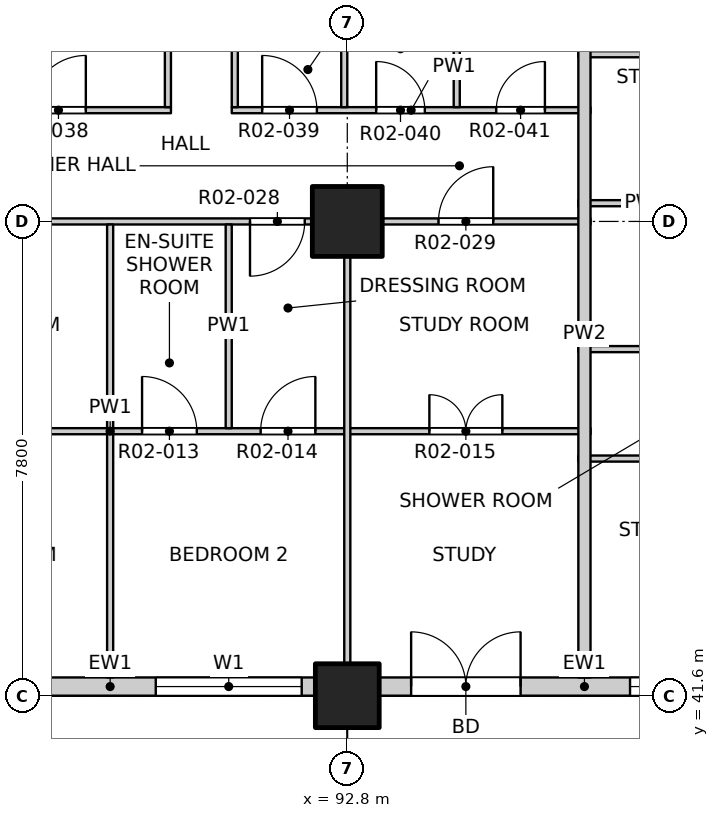
"""IFC4 building model, lengths in metres.
Left out: names, types, materials, properties, quantities, classifications, styles, units other than length and angle.
Written with IfcOpenShell. Run it as: python <this file> out.ifc"""

import sys

from ifc_helpers import new_model, si_unit, direction, frame, frame_2d, origin, origin_2d, place, context, subcontext, project, spatial, rectangle, extrude, element, fill, save


model = new_model("IFC4")
c1 = context("Model", 3, precision=1e-05, world=origin(), true_north=direction((0.0, 1.0)))
c2 = subcontext(c1, "Body", "Model", "MODEL_VIEW")
j1 = project(units=[si_unit("LENGTHUNIT", "METRE"), si_unit("PLANEANGLEUNIT", "RADIAN")], contexts=[c1])
p1 = place(None, origin())
s1 = spatial("IfcSite", under=j1, at=p1, CompositionType="ELEMENT")
p2 = place(p1, origin())
s2 = spatial("IfcBuilding", under=s1, at=p2, CompositionType="ELEMENT")
p3 = place(p2, frame((0.0, 0.0, 29.7)))
s3 = spatial("IfcBuildingStorey", under=s2, at=p3, CompositionType="ELEMENT", Elevation=29.7)
p4 = place(p3, frame((92.8, 41.6, -0.25), z_axis=(0.0, 0.0, 1.0), x_axis=(1.0, 0.0, 0.0)))
e1 = element("IfcColumn", 1, at=p4, inside=s3, PredefinedType="COLUMN", context=c2, shape_type="SweptSolid", body=[
    extrude(rectangle(XDim=1.05, YDim=1.05, at=origin_2d()), origin(), (0.0, 0.0, 1.0), 3.4),
])
p5 = place(p3, frame((92.8, 49.4, -0.25), z_axis=(0.0, 0.0, 1.0), x_axis=(1.0, 0.0, 0.0)))
e2 = element("IfcColumn", 2, at=p5, inside=s3, PredefinedType="COLUMN", context=c2, shape_type="SweptSolid", body=[
    extrude(rectangle(XDim=1.15, YDim=1.15, at=origin_2d()), origin(), (0.0, 0.0, 1.0), 3.4),
])
p6 = place(p3, frame((85.525, 41.75, 0.0), z_axis=(0.0, 0.0, 1.0), x_axis=(1.0, 0.0, 0.0)))
e3 = element("IfcWall", 3, at=p6, inside=s3, PredefinedType="SOLIDWALL", context=c2, shape_type="SweptSolid", body=[
    extrude(rectangle(XDim=6.75, YDim=0.3, at=frame_2d((3.375, 0.0))), origin(), (0.0, 0.0, 1.0), 2.7),
])
p7 = place(p6, frame((0.525, 0.0, 0.0)))
e4 = element("IfcOpeningElement", 4, at=p7, cuts=e3, PredefinedType="OPENING", context=c2, shape_type="SweptSolid", body=[
    extrude(rectangle(XDim=1.8, YDim=2.4, at=frame_2d((0.9, 1.2))), frame((0.0, 0.16, 0.0), z_axis=(0.0, -1.0, 0.0), x_axis=(1.0, 0.0, 0.0)), (0.0, 0.0, 1.0), 0.32),
])
p8 = place(p6, frame((4.125, 0.0, 0.9)))
e5 = element("IfcOpeningElement", 5, at=p8, cuts=e3, PredefinedType="OPENING", context=c2, shape_type="SweptSolid", body=[
    extrude(rectangle(XDim=2.4, YDim=1.8, at=frame_2d((1.2, 0.9))), frame((0.0, 0.16, 0.0), z_axis=(0.0, -1.0, 0.0), x_axis=(1.0, 0.0, 0.0)), (0.0, 0.0, 1.0), 0.32),
])
p9 = place(p3, frame((93.325, 41.75, 0.0), z_axis=(0.0, 0.0, 1.0), x_axis=(1.0, 0.0, 0.0)))
e6 = element("IfcWall", 6, at=p9, inside=s3, PredefinedType="SOLIDWALL", context=c2, shape_type="SweptSolid", body=[
    extrude(rectangle(XDim=6.75, YDim=0.3, at=frame_2d((3.375, 0.0))), origin(), (0.0, 0.0, 1.0), 2.7),
])
p10 = place(p9, frame((0.525, 0.0, 0.0)))
e7 = element("IfcOpeningElement", 7, at=p10, cuts=e6, PredefinedType="OPENING", context=c2, shape_type="SweptSolid", body=[
    extrude(rectangle(XDim=1.8, YDim=2.4, at=frame_2d((0.9, 1.2))), frame((0.0, 0.16, 0.0), z_axis=(0.0, -1.0, 0.0), x_axis=(1.0, 0.0, 0.0)), (0.0, 0.0, 1.0), 0.32),
])
p11 = place(p9, frame((4.125, 0.0, 0.9)))
e8 = element("IfcOpeningElement", 8, at=p11, cuts=e6, PredefinedType="OPENING", context=c2, shape_type="SweptSolid", body=[
    extrude(rectangle(XDim=2.4, YDim=1.8, at=frame_2d((1.2, 0.9))), frame((0.0, 0.16, 0.0), z_axis=(0.0, -1.0, 0.0), x_axis=(1.0, 0.0, 0.0)), (0.0, 0.0, 1.0), 0.32),
])
p12 = place(p3, frame((96.6, 45.5, 0.0), z_axis=(0.0, 0.0, 1.0), x_axis=(1.0, 0.0, 0.0)))
e9 = element("IfcWall", 9, at=p12, inside=s3, PredefinedType="PARTITIONING", context=c2, shape_type="SweptSolid", body=[
    extrude(rectangle(XDim=11.5, YDim=0.1, at=frame_2d((5.75, 0.0))), origin(), (0.0, 0.0, 1.0), 3.15),
])
p13 = place(p12, frame((2.635, 0.0, 0.0)))
e10 = element("IfcOpeningElement", 10, at=p13, cuts=e9, PredefinedType="OPENING", context=c2, shape_type="SweptSolid", body=[
    extrude(rectangle(XDim=0.9, YDim=2.1, at=frame_2d((0.45, 1.05))), frame((0.0, 0.06, 0.0), z_axis=(0.0, -1.0, 0.0), x_axis=(1.0, 0.0, 0.0)), (0.0, 0.0, 1.0), 0.12),
])
p14 = place(p3, frame((81.0, 45.95, 0.0), z_axis=(0.0, 0.0, 1.0), x_axis=(1.0, 0.0, 0.0)))
e11 = element("IfcWall", 11, at=p14, inside=s3, PredefinedType="PARTITIONING", context=c2, shape_type="SweptSolid", body=[
    extrude(rectangle(XDim=15.8, YDim=0.1, at=frame_2d((7.9, 0.0))), origin(), (0.0, 0.0, 1.0), 3.15),
])
p15 = place(p14, frame((0.625, 0.0, 0.0)))
e12 = element("IfcOpeningElement", 12, at=p15, cuts=e11, PredefinedType="OPENING", context=c2, shape_type="SweptSolid", body=[
    extrude(rectangle(XDim=0.9, YDim=2.1, at=frame_2d((0.45, 1.05))), frame((0.0, 0.06, 0.0), z_axis=(0.0, -1.0, 0.0), x_axis=(1.0, 0.0, 0.0)), (0.0, 0.0, 1.0), 0.12),
])
p16 = place(p14, frame((2.575, 0.0, 0.0)))
e13 = element("IfcOpeningElement", 13, at=p16, cuts=e11, PredefinedType="OPENING", context=c2, shape_type="SweptSolid", body=[
    extrude(rectangle(XDim=0.9, YDim=2.1, at=frame_2d((0.45, 1.05))), frame((0.0, 0.06, 0.0), z_axis=(0.0, -1.0, 0.0), x_axis=(1.0, 0.0, 0.0)), (0.0, 0.0, 1.0), 0.12),
])
p17 = place(p14, frame((5.35, 0.0, 0.0)))
e14 = element("IfcOpeningElement", 14, at=p17, cuts=e11, PredefinedType="OPENING", context=c2, shape_type="SweptSolid", body=[
    extrude(rectangle(XDim=1.2, YDim=2.1, at=frame_2d((0.6, 1.05))), frame((0.0, 0.06, 0.0), z_axis=(0.0, -1.0, 0.0), x_axis=(1.0, 0.0, 0.0)), (0.0, 0.0, 1.0), 0.12),
])
p18 = place(p14, frame((8.425, 0.0, 0.0)))
e15 = element("IfcOpeningElement", 15, at=p18, cuts=e11, PredefinedType="OPENING", context=c2, shape_type="SweptSolid", body=[
    extrude(rectangle(XDim=0.9, YDim=2.1, at=frame_2d((0.45, 1.05))), frame((0.0, 0.06, 0.0), z_axis=(0.0, -1.0, 0.0), x_axis=(1.0, 0.0, 0.0)), (0.0, 0.0, 1.0), 0.12),
])
p19 = place(p14, frame((10.375, 0.0, 0.0)))
e16 = element("IfcOpeningElement", 16, at=p19, cuts=e11, PredefinedType="OPENING", context=c2, shape_type="SweptSolid", body=[
    extrude(rectangle(XDim=0.9, YDim=2.1, at=frame_2d((0.45, 1.05))), frame((0.0, 0.06, 0.0), z_axis=(0.0, -1.0, 0.0), x_axis=(1.0, 0.0, 0.0)), (0.0, 0.0, 1.0), 0.12),
])
p20 = place(p14, frame((13.15, 0.0, 0.0)))
e17 = element("IfcOpeningElement", 17, at=p20, cuts=e11, PredefinedType="OPENING", context=c2, shape_type="SweptSolid", body=[
    extrude(rectangle(XDim=1.2, YDim=2.1, at=frame_2d((0.6, 1.05))), frame((0.0, 0.06, 0.0), z_axis=(0.0, -1.0, 0.0), x_axis=(1.0, 0.0, 0.0)), (0.0, 0.0, 1.0), 0.12),
])
p21 = place(p3, frame((96.6, 47.3, 0.0), z_axis=(0.0, 0.0, 1.0), x_axis=(1.0, 0.0, 0.0)))
e18 = element("IfcWall", 18, at=p21, inside=s3, PredefinedType="PARTITIONING", context=c2, shape_type="SweptSolid", body=[
    extrude(rectangle(XDim=2.22, YDim=0.1, at=frame_2d((1.11, 0.0))), origin(), (0.0, 0.0, 1.0), 3.15),
])
p22 = place(p3, frame((73.2, 49.4, 0.0), z_axis=(0.0, 0.0, 1.0), x_axis=(1.0, 0.0, 0.0)))
e19 = element("IfcWall", 19, at=p22, inside=s3, PredefinedType="PARTITIONING", context=c2, shape_type="SweptSolid", body=[
    extrude(rectangle(XDim=23.6, YDim=0.1, at=frame_2d((11.8, 0.0))), origin(), (0.0, 0.0, 1.0), 3.15),
])
p23 = place(p22, frame((1.6, 0.0, 0.0)))
e20 = element("IfcOpeningElement", 20, at=p23, cuts=e19, PredefinedType="OPENING", context=c2, shape_type="SweptSolid", body=[
    extrude(rectangle(XDim=0.9, YDim=2.1, at=frame_2d((0.45, 1.05))), frame((0.0, 0.06, 0.0), z_axis=(0.0, -1.0, 0.0), x_axis=(1.0, 0.0, 0.0)), (0.0, 0.0, 1.0), 0.12),
])
p24 = place(p22, frame((6.475, 0.0, 0.0)))
e21 = element("IfcOpeningElement", 21, at=p24, cuts=e19, PredefinedType="OPENING", context=c2, shape_type="SweptSolid", body=[
    extrude(rectangle(XDim=0.9, YDim=2.1, at=frame_2d((0.45, 1.05))), frame((0.0, 0.06, 0.0), z_axis=(0.0, -1.0, 0.0), x_axis=(1.0, 0.0, 0.0)), (0.0, 0.0, 1.0), 0.12),
])
p25 = place(p22, frame((10.2, 0.0, 0.0)))
e22 = element("IfcOpeningElement", 22, at=p25, cuts=e19, PredefinedType="OPENING", context=c2, shape_type="SweptSolid", body=[
    extrude(rectangle(XDim=0.9, YDim=2.1, at=frame_2d((0.45, 1.05))), frame((0.0, 0.06, 0.0), z_axis=(0.0, -1.0, 0.0), x_axis=(1.0, 0.0, 0.0)), (0.0, 0.0, 1.0), 0.12),
])
p26 = place(p22, frame((13.3, 0.0, 0.0)))
e23 = element("IfcOpeningElement", 23, at=p26, cuts=e19, PredefinedType="OPENING", context=c2, shape_type="SweptSolid", body=[
    extrude(rectangle(XDim=0.9, YDim=2.1, at=frame_2d((0.45, 1.05))), frame((0.0, 0.06, 0.0), z_axis=(0.0, -1.0, 0.0), x_axis=(1.0, 0.0, 0.0)), (0.0, 0.0, 1.0), 0.12),
])
p27 = place(p22, frame((18.0, 0.0, 0.0)))
e24 = element("IfcOpeningElement", 24, at=p27, cuts=e19, PredefinedType="OPENING", context=c2, shape_type="SweptSolid", body=[
    extrude(rectangle(XDim=0.9, YDim=2.1, at=frame_2d((0.45, 1.05))), frame((0.0, 0.06, 0.0), z_axis=(0.0, -1.0, 0.0), x_axis=(1.0, 0.0, 0.0)), (0.0, 0.0, 1.0), 0.12),
])
p28 = place(p22, frame((21.1, 0.0, 0.0)))
e25 = element("IfcOpeningElement", 25, at=p28, cuts=e19, PredefinedType="OPENING", context=c2, shape_type="SweptSolid", body=[
    extrude(rectangle(XDim=0.9, YDim=2.1, at=frame_2d((0.45, 1.05))), frame((0.0, 0.06, 0.0), z_axis=(0.0, -1.0, 0.0), x_axis=(1.0, 0.0, 0.0)), (0.0, 0.0, 1.0), 0.12),
])
p29 = place(p3, frame((96.6, 49.7, 0.0), z_axis=(0.0, 0.0, 1.0), x_axis=(1.0, 0.0, 0.0)))
e26 = element("IfcWall", 26, at=p29, inside=s3, PredefinedType="PARTITIONING", context=c2, shape_type="SweptSolid", body=[
    extrude(rectangle(XDim=2.22, YDim=0.1, at=frame_2d((1.11, 0.0))), origin(), (0.0, 0.0, 1.0), 3.15),
])
p30 = place(p3, frame((78.9, 51.23, 0.0), z_axis=(0.0, 0.0, 1.0), x_axis=(1.0, 0.0, 0.0)))
e27 = element("IfcWall", 27, at=p30, inside=s3, PredefinedType="PARTITIONING", context=c2, shape_type="SweptSolid", body=[
    extrude(rectangle(XDim=11.0, YDim=0.1, at=frame_2d((5.5, 0.0))), origin(), (0.0, 0.0, 1.0), 3.15),
])
p31 = place(p30, frame((0.725, 0.0, 0.0)))
e28 = element("IfcOpeningElement", 28, at=p31, cuts=e27, PredefinedType="OPENING", context=c2, shape_type="SweptSolid", body=[
    extrude(rectangle(XDim=0.8, YDim=2.1, at=frame_2d((0.4, 1.05))), frame((0.0, 0.06, 0.0), z_axis=(0.0, -1.0, 0.0), x_axis=(1.0, 0.0, 0.0)), (0.0, 0.0, 1.0), 0.12),
])
p32 = place(p30, frame((2.95, 0.0, 0.0)))
e29 = element("IfcOpeningElement", 29, at=p32, cuts=e27, PredefinedType="OPENING", context=c2, shape_type="SweptSolid", body=[
    extrude(rectangle(XDim=0.9, YDim=2.1, at=frame_2d((0.45, 1.05))), frame((0.0, 0.06, 0.0), z_axis=(0.0, -1.0, 0.0), x_axis=(1.0, 0.0, 0.0)), (0.0, 0.0, 1.0), 0.12),
])
p33 = place(p30, frame((5.575, 0.0, 0.0)))
e30 = element("IfcOpeningElement", 30, at=p33, cuts=e27, PredefinedType="OPENING", context=c2, shape_type="SweptSolid", body=[
    extrude(rectangle(XDim=0.8, YDim=2.1, at=frame_2d((0.4, 1.05))), frame((0.0, 0.06, 0.0), z_axis=(0.0, -1.0, 0.0), x_axis=(1.0, 0.0, 0.0)), (0.0, 0.0, 1.0), 0.12),
])
p34 = place(p30, frame((8.7, 0.0, 0.0)))
e31 = element("IfcOpeningElement", 31, at=p34, cuts=e27, PredefinedType="OPENING", context=c2, shape_type="SweptSolid", body=[
    extrude(rectangle(XDim=0.9, YDim=2.1, at=frame_2d((0.45, 1.05))), frame((0.0, 0.06, 0.0), z_axis=(0.0, -1.0, 0.0), x_axis=(1.0, 0.0, 0.0)), (0.0, 0.0, 1.0), 0.12),
])
p35 = place(p3, frame((90.9, 51.23, 0.0), z_axis=(0.0, 0.0, 1.0), x_axis=(1.0, 0.0, 0.0)))
e32 = element("IfcWall", 32, at=p35, inside=s3, PredefinedType="PARTITIONING", context=c2, shape_type="SweptSolid", body=[
    extrude(rectangle(XDim=5.9, YDim=0.1, at=frame_2d((2.95, 0.0))), origin(), (0.0, 0.0, 1.0), 3.15),
])
p36 = place(p35, frame((0.5, 0.0, 0.0)))
e33 = element("IfcOpeningElement", 33, at=p36, cuts=e32, PredefinedType="OPENING", context=c2, shape_type="SweptSolid", body=[
    extrude(rectangle(XDim=0.9, YDim=2.1, at=frame_2d((0.45, 1.05))), frame((0.0, 0.06, 0.0), z_axis=(0.0, -1.0, 0.0), x_axis=(1.0, 0.0, 0.0)), (0.0, 0.0, 1.0), 0.12),
])
p37 = place(p35, frame((2.375, 0.0, 0.0)))
e34 = element("IfcOpeningElement", 34, at=p37, cuts=e32, PredefinedType="OPENING", context=c2, shape_type="SweptSolid", body=[
    extrude(rectangle(XDim=0.8, YDim=2.1, at=frame_2d((0.4, 1.05))), frame((0.0, 0.06, 0.0), z_axis=(0.0, -1.0, 0.0), x_axis=(1.0, 0.0, 0.0)), (0.0, 0.0, 1.0), 0.12),
])
p38 = place(p35, frame((4.35, 0.0, 0.0)))
e35 = element("IfcOpeningElement", 35, at=p38, cuts=e32, PredefinedType="OPENING", context=c2, shape_type="SweptSolid", body=[
    extrude(rectangle(XDim=0.8, YDim=2.1, at=frame_2d((0.4, 1.05))), frame((0.0, 0.06, 0.0), z_axis=(0.0, -1.0, 0.0), x_axis=(1.0, 0.0, 0.0)), (0.0, 0.0, 1.0), 0.12),
])
p39 = place(p3, frame((96.6, 52.15, 0.0), z_axis=(0.0, 0.0, 1.0), x_axis=(1.0, 0.0, 0.0)))
e36 = element("IfcWall", 36, at=p39, inside=s3, PredefinedType="PARTITIONING", context=c2, shape_type="SweptSolid", body=[
    extrude(rectangle(XDim=2.22, YDim=0.1, at=frame_2d((1.11, 0.0))), origin(), (0.0, 0.0, 1.0), 3.15),
])
p40 = place(p3, frame((88.9, 41.9, 0.0), z_axis=(0.0, 0.0, 1.0), x_axis=(0.0, 1.0, 0.0)))
e37 = element("IfcWall", 37, at=p40, inside=s3, PredefinedType="PARTITIONING", context=c2, shape_type="SweptSolid", body=[
    extrude(rectangle(XDim=7.45, YDim=0.1, at=frame_2d((3.725, 0.0))), origin(), (0.0, 0.0, 1.0), 3.15),
])
p41 = place(p3, frame((89.85, 51.28, 0.0), z_axis=(0.0, 0.0, 1.0), x_axis=(0.0, 1.0, 0.0)))
e38 = element("IfcWall", 38, at=p41, inside=s3, PredefinedType="PARTITIONING", context=c2, shape_type="SweptSolid", body=[
    extrude(rectangle(XDim=1.92, YDim=0.1, at=frame_2d((0.96, 0.0))), origin(), (0.0, 0.0, 1.0), 3.15),
])
p42 = place(p3, frame((90.85, 46.0, 0.0), z_axis=(0.0, 0.0, 1.0), x_axis=(0.0, 1.0, 0.0)))
e39 = element("IfcWall", 39, at=p42, inside=s3, PredefinedType="PARTITIONING", context=c2, shape_type="SweptSolid", body=[
    extrude(rectangle(XDim=3.35, YDim=0.1, at=frame_2d((1.675, 0.0))), origin(), (0.0, 0.0, 1.0), 3.15),
])
for number, where, z_axis, x_axis in (
    (40, (90.95, 51.28, 0.0), (0.0, 0.0, 1.0), (0.0, 1.0, 0.0)),
    (41, (92.75, 51.28, 0.0), (0.0, 0.0, 1.0), (0.0, 1.0, 0.0)),
):
    element("IfcWall", number, at=place(p3, frame(where, z_axis=z_axis, x_axis=x_axis)), inside=s3, PredefinedType="PARTITIONING", context=c2, shape_type="SweptSolid", body=[
        extrude(rectangle(XDim=1.92, YDim=0.1, at=frame_2d((0.96, 0.0))), origin(), (0.0, 0.0, 1.0), 3.15),
    ])
p43 = place(p3, frame((92.8, 41.9, 0.0), z_axis=(0.0, 0.0, 1.0), x_axis=(0.0, 1.0, 0.0)))
e42 = element("IfcWall", 42, at=p43, inside=s3, PredefinedType="PARTITIONING", context=c2, shape_type="SweptSolid", body=[
    extrude(rectangle(XDim=7.45, YDim=0.1, at=frame_2d((3.725, 0.0))), origin(), (0.0, 0.0, 1.0), 2.55),
])
p44 = place(p3, frame((94.6, 51.28, 0.0), z_axis=(0.0, 0.0, 1.0), x_axis=(0.0, 1.0, 0.0)))
e43 = element("IfcWall", 43, at=p44, inside=s3, PredefinedType="PARTITIONING", context=c2, shape_type="SweptSolid", body=[
    extrude(rectangle(XDim=1.92, YDim=0.1, at=frame_2d((0.96, 0.0))), origin(), (0.0, 0.0, 1.0), 3.15),
])
p45 = place(p3, frame((96.7, 41.9, 0.0), z_axis=(0.0, 0.0, 1.0), x_axis=(0.0, 1.0, 0.0)))
e44 = element("IfcWall", 44, at=p45, inside=s3, PredefinedType="PARTITIONING", context=c2, shape_type="SweptSolid", body=[
    extrude(rectangle(XDim=11.3, YDim=0.2, at=frame_2d((5.65, 0.0))), origin(), (0.0, 0.0, 1.0), 3.15),
])
p46 = place(p8, origin())
e45 = element("IfcWindow", 45, at=p46, inside=s3, PartitioningType="DOUBLE_PANEL_VERTICAL", PredefinedType="WINDOW", context=c2, shape_type="SweptSolid", body=[
    extrude(rectangle(XDim=2.4, YDim=1.8, at=frame_2d((1.2, 0.9))), frame((0.0, 0.03, 0.0), z_axis=(0.0, -1.0, 0.0), x_axis=(1.0, 0.0, 0.0)), (0.0, 0.0, 1.0), 0.06),
])
fill(e5, e45)
p47 = place(p10, origin())
e46 = element("IfcDoor", 46, at=p47, inside=s3, OperationType="DOUBLE_DOOR_SINGLE_SWING", PredefinedType="DOOR", context=c2, shape_type="SweptSolid", body=[
    extrude(rectangle(XDim=1.8, YDim=2.4, at=frame_2d((0.9, 1.2))), frame((0.0, 0.025, 0.0), z_axis=(0.0, -1.0, 0.0), x_axis=(1.0, 0.0, 0.0)), (0.0, 0.0, 1.0), 0.05),
])
fill(e7, e46)
p48 = place(p11, origin())
e47 = element("IfcWindow", 47, at=p48, inside=s3, PartitioningType="DOUBLE_PANEL_VERTICAL", PredefinedType="WINDOW", context=c2, shape_type="SweptSolid", body=[
    extrude(rectangle(XDim=2.4, YDim=1.8, at=frame_2d((1.2, 0.9))), frame((0.0, 0.03, 0.0), z_axis=(0.0, -1.0, 0.0), x_axis=(1.0, 0.0, 0.0)), (0.0, 0.0, 1.0), 0.06),
])
fill(e8, e47)
p49 = place(p18, origin())
e48 = element("IfcDoor", 48, at=p49, inside=s3, OperationType="SINGLE_SWING_LEFT", PredefinedType="DOOR", context=c2, shape_type="SweptSolid", body=[
    extrude(rectangle(XDim=0.9, YDim=2.1, at=frame_2d((0.45, 1.05))), frame((0.0, 0.025, 0.0), z_axis=(0.0, -1.0, 0.0), x_axis=(1.0, 0.0, 0.0)), (0.0, 0.0, 1.0), 0.05),
])
fill(e15, e48)
p50 = place(p19, origin())
e49 = element("IfcDoor", 49, at=p50, inside=s3, OperationType="SINGLE_SWING_RIGHT", PredefinedType="DOOR", context=c2, shape_type="SweptSolid", body=[
    extrude(rectangle(XDim=0.9, YDim=2.1, at=frame_2d((0.45, 1.05))), frame((0.0, 0.025, 0.0), z_axis=(0.0, -1.0, 0.0), x_axis=(1.0, 0.0, 0.0)), (0.0, 0.0, 1.0), 0.05),
])
fill(e16, e49)
p51 = place(p20, origin())
e50 = element("IfcDoor", 50, at=p51, inside=s3, OperationType="DOUBLE_DOOR_SINGLE_SWING", PredefinedType="DOOR", context=c2, shape_type="SweptSolid", body=[
    extrude(rectangle(XDim=1.2, YDim=2.1, at=frame_2d((0.6, 1.05))), frame((0.0, 0.025, 0.0), z_axis=(0.0, -1.0, 0.0), x_axis=(1.0, 0.0, 0.0)), (0.0, 0.0, 1.0), 0.05),
])
fill(e17, e50)
p52 = place(p27, origin())
e51 = element("IfcDoor", 51, at=p52, inside=s3, OperationType="SINGLE_SWING_RIGHT", PredefinedType="DOOR", context=c2, shape_type="SweptSolid", body=[
    extrude(rectangle(XDim=0.9, YDim=2.1, at=frame_2d((0.45, 1.05))), frame((0.0, 0.025, 0.0), z_axis=(0.0, -1.0, 0.0), x_axis=(1.0, 0.0, 0.0)), (0.0, 0.0, 1.0), 0.05),
])
fill(e24, e51)
p53 = place(p28, origin())
e52 = element("IfcDoor", 52, at=p53, inside=s3, OperationType="SINGLE_SWING_RIGHT", PredefinedType="DOOR", context=c2, shape_type="SweptSolid", body=[
    extrude(rectangle(XDim=0.9, YDim=2.1, at=frame_2d((0.45, 1.05))), frame((0.0, 0.025, 0.0), z_axis=(0.0, -1.0, 0.0), x_axis=(1.0, 0.0, 0.0)), (0.0, 0.0, 1.0), 0.05),
])
fill(e25, e52)
p54 = place(p34, origin())
e53 = element("IfcDoor", 53, at=p54, inside=s3, OperationType="SINGLE_SWING_RIGHT", PredefinedType="DOOR", context=c2, shape_type="SweptSolid", body=[
    extrude(rectangle(XDim=0.9, YDim=2.1, at=frame_2d((0.45, 1.05))), frame((0.0, 0.025, 0.0), z_axis=(0.0, -1.0, 0.0), x_axis=(1.0, 0.0, 0.0)), (0.0, 0.0, 1.0), 0.05),
])
fill(e31, e53)
p55 = place(p36, origin())
e54 = element("IfcDoor", 54, at=p55, inside=s3, OperationType="SINGLE_SWING_LEFT", PredefinedType="DOOR", context=c2, shape_type="SweptSolid", body=[
    extrude(rectangle(XDim=0.9, YDim=2.1, at=frame_2d((0.45, 1.05))), frame((0.0, 0.025, 0.0), z_axis=(0.0, -1.0, 0.0), x_axis=(1.0, 0.0, 0.0)), (0.0, 0.0, 1.0), 0.05),
])
fill(e33, e54)
p56 = place(p37, origin())
e55 = element("IfcDoor", 55, at=p56, inside=s3, OperationType="SINGLE_SWING_LEFT", PredefinedType="DOOR", context=c2, shape_type="SweptSolid", body=[
    extrude(rectangle(XDim=0.8, YDim=2.1, at=frame_2d((0.4, 1.05))), frame((0.0, 0.025, 0.0), z_axis=(0.0, -1.0, 0.0), x_axis=(1.0, 0.0, 0.0)), (0.0, 0.0, 1.0), 0.05),
])
fill(e34, e55)
p57 = place(p38, origin())
e56 = element("IfcDoor", 56, at=p57, inside=s3, OperationType="SINGLE_SWING_RIGHT", PredefinedType="DOOR", context=c2, shape_type="SweptSolid", body=[
    extrude(rectangle(XDim=0.8, YDim=2.1, at=frame_2d((0.4, 1.05))), frame((0.0, 0.025, 0.0), z_axis=(0.0, -1.0, 0.0), x_axis=(1.0, 0.0, 0.0)), (0.0, 0.0, 1.0), 0.05),
])
fill(e35, e56)
save(model, sys.argv[1])
